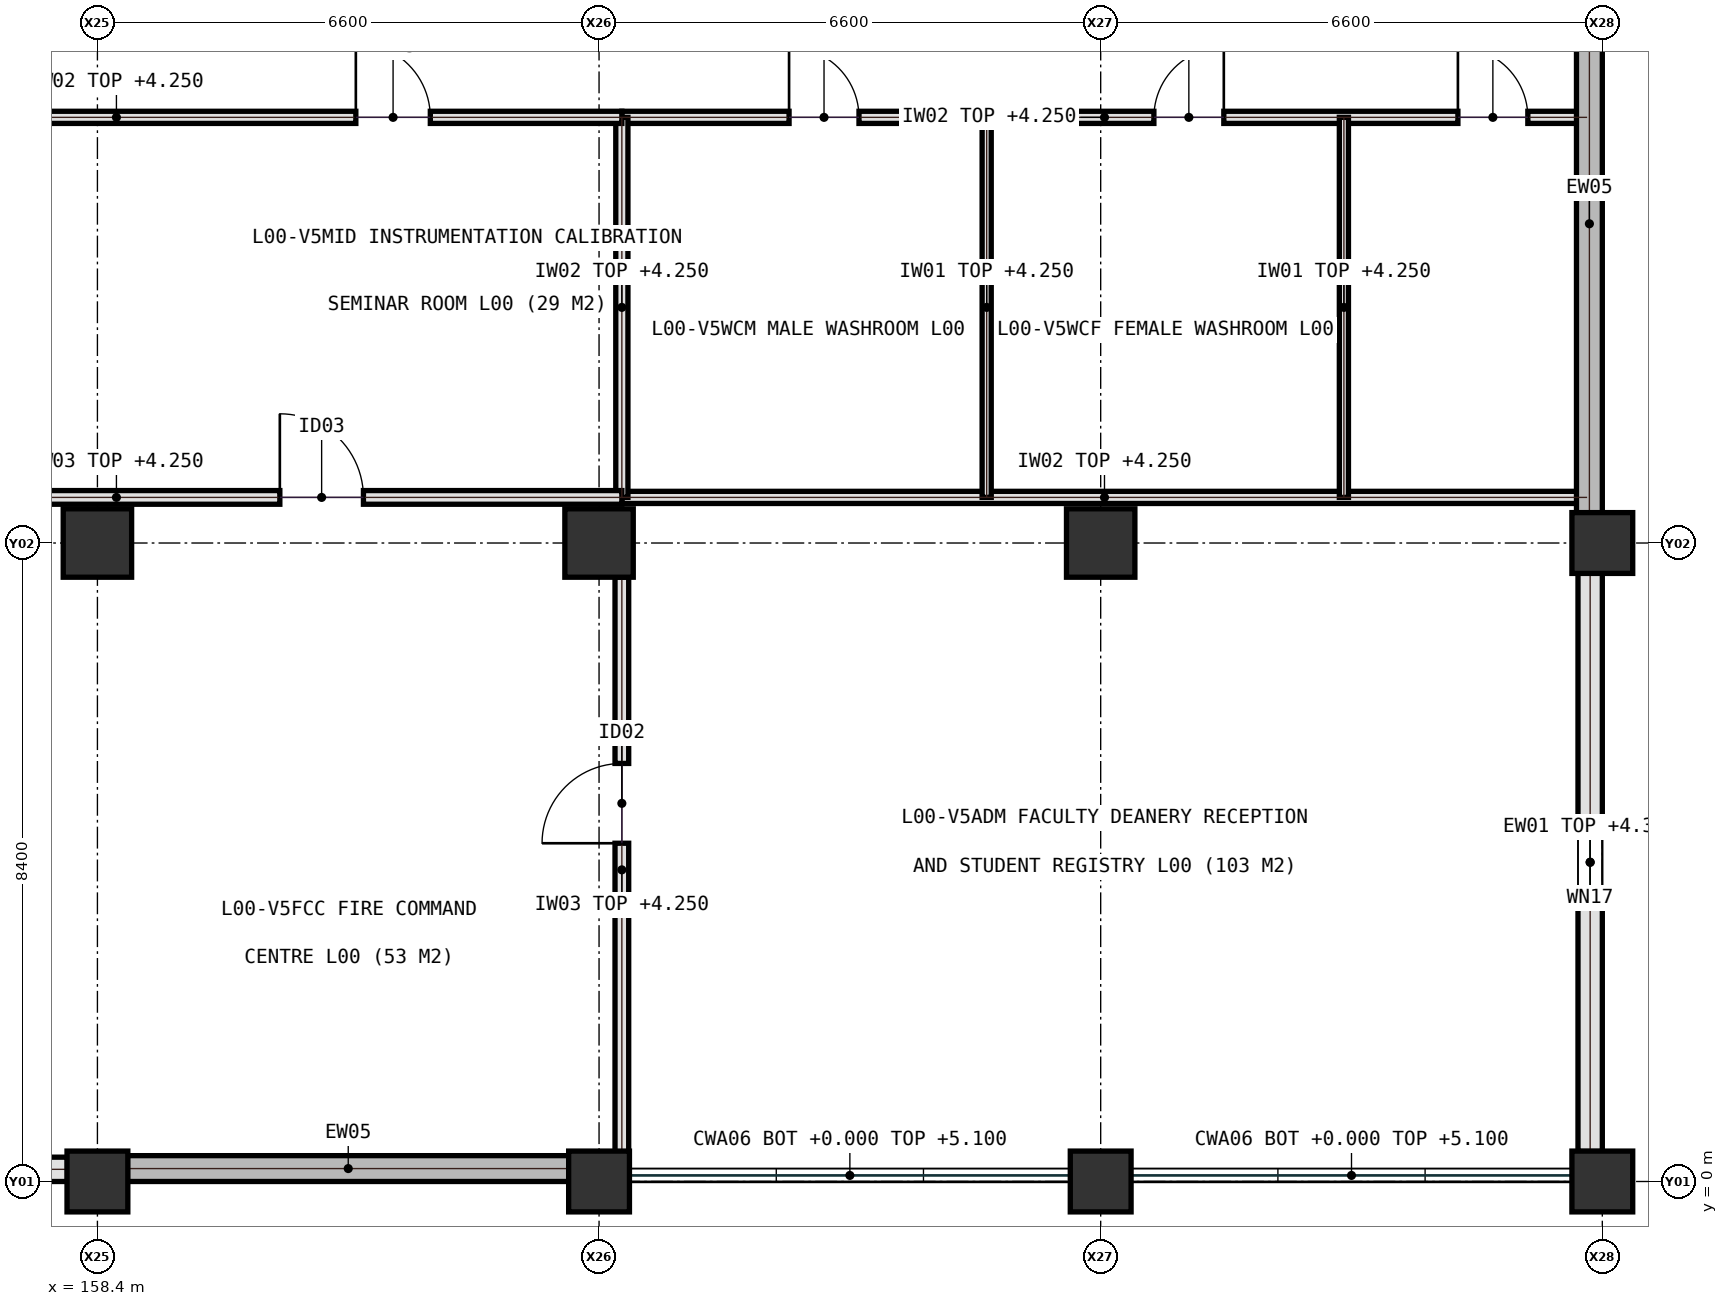
"""IFC4 building model, lengths in metres.
Left out: names, types, materials, properties, quantities, classifications, styles, units other than length and angle.
Written with IfcOpenShell. Run it as: python <this file> out.ifc"""

import sys

from ifc_helpers import new_model, si_unit, direction, frame, frame_2d, origin, origin_2d, place, context, subcontext, project, spatial, rectangle, extrude, element, fill, save


model = new_model("IFC4")
c1 = context("Model", 3, precision=1e-05, world=origin(), true_north=direction((0.0, 1.0)))
c2 = subcontext(c1, "Body", "Model", "MODEL_VIEW")
j1 = project(units=[si_unit("LENGTHUNIT", "METRE"), si_unit("PLANEANGLEUNIT", "RADIAN")], contexts=[c1])
p1 = place(None, origin())
s1 = spatial("IfcSite", under=j1, at=p1, CompositionType="ELEMENT")
p2 = place(p1, origin())
s2 = spatial("IfcBuilding", under=s1, at=p2, CompositionType="ELEMENT")
p3 = place(p2, origin())
s3 = spatial("IfcBuildingStorey", under=s2, at=p3, CompositionType="ELEMENT", Elevation=0.0)
p4 = place(p3, frame((158.4, 0.0, 0.0), z_axis=(0.0, 0.0, 1.0), x_axis=(1.0, 0.0, 0.0)))
e1 = element("IfcColumn", 1, at=p4, inside=s3, PredefinedType="COLUMN", context=c2, shape_type="SweptSolid", body=[
    extrude(rectangle(XDim=0.8, YDim=0.8, at=origin_2d()), origin(), (0.0, 0.0, 1.0), 5.4),
])
p5 = place(p3, frame((158.4, 8.4, 0.0), z_axis=(0.0, 0.0, 1.0), x_axis=(1.0, 0.0, 0.0)))
e2 = element("IfcColumn", 2, at=p5, inside=s3, PredefinedType="COLUMN", context=c2, shape_type="SweptSolid", body=[
    extrude(rectangle(XDim=0.9, YDim=0.9, at=origin_2d()), origin(), (0.0, 0.0, 1.0), 5.4),
])
p6 = place(p3, frame((165.0, 0.0, 0.0), z_axis=(0.0, 0.0, 1.0), x_axis=(1.0, 0.0, 0.0)))
e3 = element("IfcColumn", 3, at=p6, inside=s3, PredefinedType="COLUMN", context=c2, shape_type="SweptSolid", body=[
    extrude(rectangle(XDim=0.8, YDim=0.8, at=origin_2d()), origin(), (0.0, 0.0, 1.0), 5.4),
])
p7 = place(p3, frame((165.0, 8.4, 0.0), z_axis=(0.0, 0.0, 1.0), x_axis=(1.0, 0.0, 0.0)))
e4 = element("IfcColumn", 4, at=p7, inside=s3, PredefinedType="COLUMN", context=c2, shape_type="SweptSolid", body=[
    extrude(rectangle(XDim=0.9, YDim=0.9, at=origin_2d()), origin(), (0.0, 0.0, 1.0), 5.4),
])
p8 = place(p3, frame((171.6, 0.0, 0.0), z_axis=(0.0, 0.0, 1.0), x_axis=(1.0, 0.0, 0.0)))
e5 = element("IfcColumn", 5, at=p8, inside=s3, PredefinedType="COLUMN", context=c2, shape_type="SweptSolid", body=[
    extrude(rectangle(XDim=0.8, YDim=0.8, at=origin_2d()), origin(), (0.0, 0.0, 1.0), 5.4),
])
p9 = place(p3, frame((171.6, 8.4, 0.0), z_axis=(0.0, 0.0, 1.0), x_axis=(1.0, 0.0, 0.0)))
e6 = element("IfcColumn", 6, at=p9, inside=s3, PredefinedType="COLUMN", context=c2, shape_type="SweptSolid", body=[
    extrude(rectangle(XDim=0.9, YDim=0.9, at=origin_2d()), origin(), (0.0, 0.0, 1.0), 5.4),
])
for number, where, z_axis, x_axis in (
    (7, (178.2, 0.0, 0.0), (0.0, 0.0, 1.0), (1.0, 0.0, 0.0)),
    (8, (178.2, 8.4, 0.0), (0.0, 0.0, 1.0), (1.0, 0.0, 0.0)),
):
    element("IfcColumn", number, at=place(p3, frame(where, z_axis=z_axis, x_axis=x_axis)), inside=s3, PredefinedType="COLUMN", context=c2, shape_type="SweptSolid", body=[
        extrude(rectangle(XDim=0.8, YDim=0.8, at=origin_2d()), origin(), (0.0, 0.0, 1.0), 5.4),
    ])
p10 = place(p3, frame((165.3, 14.0, 0.0), z_axis=(0.0, 0.0, 1.0), x_axis=(1.0, 0.0, 0.0)))
e9 = element("IfcWall", 9, at=p10, inside=s3, PredefinedType="PARTITIONING", context=c2, shape_type="SweptSolid", body=[
    extrude(rectangle(XDim=12.7, YDim=0.16, at=frame_2d((6.35, 0.0))), origin(), (0.0, 0.0, 1.0), 4.25),
])
p11 = place(p10, frame((2.2, 0.0, 0.0)))
e10 = element("IfcOpeningElement", 10, at=p11, cuts=e9, PredefinedType="OPENING", context=c2, shape_type="SweptSolid", body=[
    extrude(rectangle(XDim=0.92, YDim=2.08, at=frame_2d((0.46, 1.04))), frame((0.0, 0.09, 0.0), z_axis=(0.0, -1.0, 0.0), x_axis=(1.0, 0.0, 0.0)), (0.0, 0.0, 1.0), 0.18),
])
p12 = place(p10, frame((7.0, 0.0, 0.0)))
e11 = element("IfcOpeningElement", 11, at=p12, cuts=e9, PredefinedType="OPENING", context=c2, shape_type="SweptSolid", body=[
    extrude(rectangle(XDim=0.92, YDim=2.08, at=frame_2d((0.46, 1.04))), frame((0.0, 0.09, 0.0), z_axis=(0.0, -1.0, 0.0), x_axis=(1.0, 0.0, 0.0)), (0.0, 0.0, 1.0), 0.18),
])
p13 = place(p10, frame((11.0, 0.0, 0.0)))
e12 = element("IfcOpeningElement", 12, at=p13, cuts=e9, PredefinedType="OPENING", context=c2, shape_type="SweptSolid", body=[
    extrude(rectangle(XDim=0.92, YDim=2.08, at=frame_2d((0.46, 1.04))), frame((0.0, 0.09, 0.0), z_axis=(0.0, -1.0, 0.0), x_axis=(1.0, 0.0, 0.0)), (0.0, 0.0, 1.0), 0.18),
])
p14 = place(p3, frame((165.3, 9.0, 0.0), z_axis=(0.0, 0.0, 1.0), x_axis=(1.0, 0.0, 0.0)))
e13 = element("IfcWall", 13, at=p14, inside=s3, PredefinedType="PARTITIONING", context=c2, shape_type="SweptSolid", body=[
    extrude(rectangle(XDim=12.7, YDim=0.16, at=frame_2d((6.35, 0.0))), origin(), (0.0, 0.0, 1.0), 4.25),
])
p15 = place(p3, frame((165.3, 9.0, 0.0), z_axis=(0.0, 0.0, 1.0), x_axis=(0.0, 1.0, 0.0)))
e14 = element("IfcWall", 14, at=p15, inside=s3, PredefinedType="PARTITIONING", context=c2, shape_type="SweptSolid", body=[
    extrude(rectangle(XDim=5.0, YDim=0.16, at=frame_2d((2.5, 0.0))), origin(), (0.0, 0.0, 1.0), 4.25),
])
for number, where, z_axis, x_axis in (
    (15, (170.1, 9.0, 0.0), (0.0, 0.0, 1.0), (0.0, 1.0, 0.0)),
    (16, (174.8, 9.0, 0.0), (0.0, 0.0, 1.0), (0.0, 1.0, 0.0)),
):
    element("IfcWall", number, at=place(p3, frame(where, z_axis=z_axis, x_axis=x_axis)), inside=s3, PredefinedType="PARTITIONING", context=c2, shape_type="SweptSolid", body=[
        extrude(rectangle(XDim=5.0, YDim=0.12, at=frame_2d((2.5, 0.0))), origin(), (0.0, 0.0, 1.0), 4.25),
    ])
p16 = place(p3, frame((152.0, 9.0, 0.0), z_axis=(0.0, 0.0, 1.0), x_axis=(1.0, 0.0, 0.0)))
e17 = element("IfcWall", 17, at=p16, inside=s3, PredefinedType="SOLIDWALL", context=c2, shape_type="SweptSolid", body=[
    extrude(rectangle(XDim=13.3, YDim=0.18, at=frame_2d((6.65, 0.0))), origin(), (0.0, 0.0, 1.0), 4.25),
])
p17 = place(p16, frame((8.8, 0.0, 0.0)))
e18 = element("IfcOpeningElement", 18, at=p17, cuts=e17, PredefinedType="OPENING", context=c2, shape_type="SweptSolid", body=[
    extrude(rectangle(XDim=1.1, YDim=2.15, at=frame_2d((0.55, 1.075))), frame((0.0, 0.1, 0.0), z_axis=(0.0, -1.0, 0.0), x_axis=(1.0, 0.0, 0.0)), (0.0, 0.0, 1.0), 0.2),
])
p18 = place(p3, frame((165.3, 0.25, 0.0), z_axis=(0.0, 0.0, 1.0), x_axis=(0.0, 1.0, 0.0)))
e19 = element("IfcWall", 19, at=p18, inside=s3, PredefinedType="SOLIDWALL", context=c2, shape_type="SweptSolid", body=[
    extrude(rectangle(XDim=7.7, YDim=0.18, at=frame_2d((3.85, 0.0))), origin(), (0.0, 0.0, 1.0), 4.25),
])
p19 = place(p18, frame((4.2, 0.0, 0.0)))
e20 = element("IfcOpeningElement", 20, at=p19, cuts=e19, PredefinedType="OPENING", context=c2, shape_type="SweptSolid", body=[
    extrude(rectangle(XDim=1.05, YDim=2.15, at=frame_2d((0.525, 1.075))), frame((0.0, 0.1, 0.0), z_axis=(0.0, -1.0, 0.0), x_axis=(1.0, 0.0, 0.0)), (0.0, 0.0, 1.0), 0.2),
])
p20 = place(p3, frame((152.0, 14.0, 0.0), z_axis=(0.0, 0.0, 1.0), x_axis=(1.0, 0.0, 0.0)))
e21 = element("IfcWall", 21, at=p20, inside=s3, PredefinedType="PARTITIONING", context=c2, shape_type="SweptSolid", body=[
    extrude(rectangle(XDim=13.3, YDim=0.16, at=frame_2d((6.65, 0.0))), origin(), (0.0, 0.0, 1.0), 4.25),
])
p21 = place(p20, frame((9.8, 0.0, 0.0)))
e22 = element("IfcOpeningElement", 22, at=p21, cuts=e21, PredefinedType="OPENING", context=c2, shape_type="SweptSolid", body=[
    extrude(rectangle(XDim=0.98, YDim=2.12, at=frame_2d((0.49, 1.06))), frame((0.0, 0.09, 0.0), z_axis=(0.0, -1.0, 0.0), x_axis=(1.0, 0.0, 0.0)), (0.0, 0.0, 1.0), 0.18),
])
p22 = place(p3, frame((152.195, 0.16, 0.0), z_axis=(0.0, 0.0, 1.0), x_axis=(1.0, 0.0, 0.0)))
e23 = element("IfcWall", 23, at=p22, inside=s3, PredefinedType="SOLIDWALL", context=c2, shape_type="SweptSolid", body=[
    extrude(rectangle(XDim=5.81, YDim=0.32, at=frame_2d((2.905, 0.0))), origin(), (0.0, 0.0, 1.0), 4.385),
])
p23 = place(p22, frame((1.405, 0.0, 0.95)))
e24 = element("IfcOpeningElement", 24, at=p23, cuts=e23, PredefinedType="OPENING", context=c2, shape_type="SweptSolid", body=[
    extrude(rectangle(XDim=3.0, YDim=1.8, at=frame_2d((1.5, 0.9))), frame((0.0, 0.17, 0.0), z_axis=(0.0, -1.0, 0.0), x_axis=(1.0, 0.0, 0.0)), (0.0, 0.0, 1.0), 0.34),
])
p24 = place(p3, frame((158.795, 0.17, 0.0), z_axis=(0.0, 0.0, 1.0), x_axis=(1.0, 0.0, 0.0)))
e25 = element("IfcWall", 25, at=p24, inside=s3, PredefinedType="SHEAR", context=c2, shape_type="SweptSolid", body=[
    extrude(rectangle(XDim=5.81, YDim=0.34, at=frame_2d((2.905, 0.0))), origin(), (0.0, 0.0, 1.0), 5.1),
])
p25 = place(p3, frame((178.04, 0.395, 0.0), z_axis=(0.0, 0.0, 1.0), x_axis=(0.0, 1.0, 0.0)))
e26 = element("IfcWall", 26, at=p25, inside=s3, PredefinedType="SOLIDWALL", context=c2, shape_type="SweptSolid", body=[
    extrude(rectangle(XDim=7.61, YDim=0.32, at=frame_2d((3.805, 0.0))), origin(), (0.0, 0.0, 1.0), 4.335),
])
p26 = place(p25, frame((3.28, 0.0, 0.95)))
e27 = element("IfcOpeningElement", 27, at=p26, cuts=e26, PredefinedType="OPENING", context=c2, shape_type="SweptSolid", body=[
    extrude(rectangle(XDim=1.05, YDim=1.75, at=frame_2d((0.525, 0.875))), frame((0.0, 0.17, 0.0), z_axis=(0.0, -1.0, 0.0), x_axis=(1.0, 0.0, 0.0)), (0.0, 0.0, 1.0), 0.34),
])
p27 = place(p3, frame((178.03, 8.795, 0.0), z_axis=(0.0, 0.0, 1.0), x_axis=(0.0, 1.0, 0.0)))
e28 = element("IfcWall", 28, at=p27, inside=s3, PredefinedType="SHEAR", context=c2, shape_type="SweptSolid", body=[
    extrude(rectangle(XDim=7.61, YDim=0.34, at=frame_2d((3.805, 0.0))), origin(), (0.0, 0.0, 1.0), 5.1),
])
p28 = place(p11, origin())
e29 = element("IfcDoor", 29, at=p28, inside=s3, OperationType="SINGLE_SWING_LEFT", PredefinedType="DOOR", context=c2, shape_type="SweptSolid", body=[
    extrude(rectangle(XDim=0.92, YDim=2.08, at=frame_2d((0.46, 1.04))), frame((0.0, 0.025, 0.0), z_axis=(0.0, -1.0, 0.0), x_axis=(1.0, 0.0, 0.0)), (0.0, 0.0, 1.0), 0.05),
])
fill(e10, e29)
p29 = place(p12, origin())
e30 = element("IfcDoor", 30, at=p29, inside=s3, OperationType="SINGLE_SWING_RIGHT", PredefinedType="DOOR", context=c2, shape_type="SweptSolid", body=[
    extrude(rectangle(XDim=0.92, YDim=2.08, at=frame_2d((0.46, 1.04))), frame((0.0, 0.025, 0.0), z_axis=(0.0, -1.0, 0.0), x_axis=(1.0, 0.0, 0.0)), (0.0, 0.0, 1.0), 0.05),
])
fill(e11, e30)
p30 = place(p13, origin())
e31 = element("IfcDoor", 31, at=p30, inside=s3, OperationType="SINGLE_SWING_LEFT", PredefinedType="DOOR", context=c2, shape_type="SweptSolid", body=[
    extrude(rectangle(XDim=0.92, YDim=2.08, at=frame_2d((0.46, 1.04))), frame((0.0, 0.025, 0.0), z_axis=(0.0, -1.0, 0.0), x_axis=(1.0, 0.0, 0.0)), (0.0, 0.0, 1.0), 0.05),
])
fill(e12, e31)
p31 = place(p17, origin())
e32 = element("IfcDoor", 32, at=p31, inside=s3, OperationType="SINGLE_SWING_LEFT", PredefinedType="DOOR", context=c2, shape_type="SweptSolid", body=[
    extrude(rectangle(XDim=1.1, YDim=2.15, at=frame_2d((0.55, 1.075))), frame((0.0, 0.025, 0.0), z_axis=(0.0, -1.0, 0.0), x_axis=(1.0, 0.0, 0.0)), (0.0, 0.0, 1.0), 0.05),
])
fill(e18, e32)
p32 = place(p19, origin())
e33 = element("IfcDoor", 33, at=p32, inside=s3, OperationType="SINGLE_SWING_LEFT", PredefinedType="DOOR", context=c2, shape_type="SweptSolid", body=[
    extrude(rectangle(XDim=1.05, YDim=2.15, at=frame_2d((0.525, 1.075))), frame((0.0, 0.025, 0.0), z_axis=(0.0, -1.0, 0.0), x_axis=(1.0, 0.0, 0.0)), (0.0, 0.0, 1.0), 0.05),
])
fill(e20, e33)
p33 = place(p21, origin())
e34 = element("IfcDoor", 34, at=p33, inside=s3, OperationType="SINGLE_SWING_LEFT", PredefinedType="DOOR", context=c2, shape_type="SweptSolid", body=[
    extrude(rectangle(XDim=0.98, YDim=2.12, at=frame_2d((0.49, 1.06))), frame((0.0, 0.025, 0.0), z_axis=(0.0, -1.0, 0.0), x_axis=(1.0, 0.0, 0.0)), (0.0, 0.0, 1.0), 0.05),
])
fill(e22, e34)
p34 = place(p26, origin())
e35 = element("IfcWindow", 35, at=p34, inside=s3, PartitioningType="SINGLE_PANEL", PredefinedType="WINDOW", context=c2, shape_type="SweptSolid", body=[
    extrude(rectangle(XDim=1.05, YDim=1.75, at=frame_2d((0.525, 0.875))), frame((0.0, 0.03, 0.0), z_axis=(0.0, -1.0, 0.0), x_axis=(1.0, 0.0, 0.0)), (0.0, 0.0, 1.0), 0.06),
])
fill(e27, e35)
save(model, sys.argv[1])
